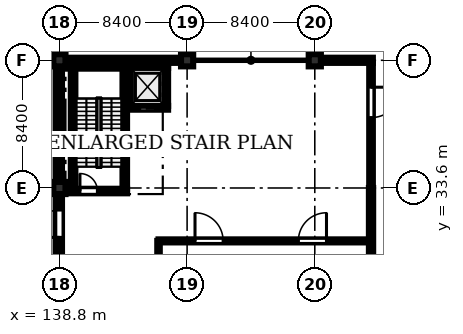
"""IFC4 building model, lengths in metres.
Left out: names, types, materials, properties, quantities, classifications, styles, units other than length and angle.
Written with IfcOpenShell. Run it as: python <this file> out.ifc"""

import sys

from ifc_helpers import new_model, si_unit, direction, frame, frame_2d, origin, origin_2d, place, context, subcontext, project, spatial, rectangle, i_section, extrude, element, fill, save


model = new_model("IFC4")
c1 = context("Model", 3, precision=1e-05, world=origin(), true_north=direction((0.0, 1.0)))
c2 = subcontext(c1, "Body", "Model", "MODEL_VIEW")
j1 = project(units=[si_unit("LENGTHUNIT", "METRE"), si_unit("PLANEANGLEUNIT", "RADIAN")], contexts=[c1])
p1 = place(None, origin())
s1 = spatial("IfcSite", under=j1, at=p1, CompositionType="ELEMENT")
p2 = place(p1, origin())
s2 = spatial("IfcBuilding", under=s1, at=p2, CompositionType="ELEMENT")
p3 = place(p2, origin())
s3 = spatial("IfcBuildingStorey", under=s2, at=p3, CompositionType="ELEMENT", Elevation=0.0)
for number, where, z_axis, x_axis in (
    (1, (138.8, 33.6, 0.0), (0.0, 0.0, 1.0), (1.0, 0.0, 0.0)),
    (2, (138.8, 42.0, 0.0), (0.0, 0.0, 1.0), (1.0, 0.0, 0.0)),
    (3, (147.2, 42.0, 0.0), (0.0, 0.0, 1.0), (1.0, 0.0, 0.0)),
    (4, (155.6, 42.0, 0.0), (0.0, 0.0, 1.0), (1.0, 0.0, 0.0)),
):
    element("IfcColumn", number, at=place(p3, frame(where, z_axis=z_axis, x_axis=x_axis)), inside=s3, PredefinedType="COLUMN", context=c2, shape_type="SweptSolid", body=[
        extrude(rectangle(XDim=0.8, YDim=0.8, at=origin_2d()), origin(), (0.0, 0.0, 1.0), 5.18),
    ])
p4 = place(p3, frame((139.2, 33.4, 0.0), z_axis=(0.0, 0.0, 1.0), x_axis=(1.0, 0.0, 0.0)))
e5 = element("IfcWall", 5, at=p4, inside=s3, PredefinedType="SHEAR", context=c2, shape_type="SweptSolid", body=[
    extrude(rectangle(XDim=4.05, YDim=0.3, at=frame_2d((2.025, 0.0))), origin(), (0.0, 0.0, 1.0), 5.18),
])
p5 = place(p4, frame((0.95, 0.0, 0.0)))
e6 = element("IfcOpeningElement", 6, at=p5, cuts=e5, PredefinedType="OPENING", context=c2, shape_type="SweptSolid", body=[
    extrude(rectangle(XDim=1.15, YDim=2.15, at=frame_2d((0.575, 1.075))), frame((0.0, 0.16, 0.0), z_axis=(0.0, -1.0, 0.0), x_axis=(1.0, 0.0, 0.0)), (0.0, 0.0, 1.0), 0.32),
])
p6 = place(p3, frame((139.2, 41.6, 0.0), z_axis=(0.0, 0.0, 1.0), x_axis=(1.0, 0.0, 0.0)))
e7 = element("IfcWall", 7, at=p6, inside=s3, PredefinedType="SHEAR", context=c2, shape_type="SweptSolid", body=[
    extrude(rectangle(XDim=4.05, YDim=0.3, at=frame_2d((2.025, 0.0))), origin(), (0.0, 0.0, 1.0), 5.18),
])
for number, where, z_axis, x_axis in (
    (8, (139.7, 33.55, 0.0), (0.0, 0.0, 1.0), (0.0, 1.0, 0.0)),
    (9, (143.1, 33.55, 0.0), (0.0, 0.0, 1.0), (0.0, 1.0, 0.0)),
):
    element("IfcWall", number, at=place(p3, frame(where, z_axis=z_axis, x_axis=x_axis)), inside=s3, PredefinedType="SHEAR", context=c2, shape_type="SweptSolid", body=[
        extrude(rectangle(XDim=7.9, YDim=0.3, at=frame_2d((3.95, 0.0))), origin(), (0.0, 0.0, 1.0), 5.18),
    ])
p7 = place(p3, frame((143.25, 38.875, 0.0), z_axis=(0.0, 0.0, 1.0), x_axis=(1.0, 0.0, 0.0)))
e10 = element("IfcWall", 10, at=p7, inside=s3, PredefinedType="SHEAR", context=c2, shape_type="SweptSolid", body=[
    extrude(rectangle(XDim=2.7, YDim=0.25, at=frame_2d((1.35, 0.0))), origin(), (0.0, 0.0, 1.0), 5.18),
])
p8 = place(p7, frame((0.835, 0.0, 0.0)))
e11 = element("IfcOpeningElement", 11, at=p8, cuts=e10, PredefinedType="OPENING", context=c2, shape_type="SweptSolid", body=[
    extrude(rectangle(XDim=1.03, YDim=2.15, at=frame_2d((0.515, 1.075))), frame((0.0, 0.135, 0.0), z_axis=(0.0, -1.0, 0.0), x_axis=(1.0, 0.0, 0.0)), (0.0, 0.0, 1.0), 0.27),
])
p9 = place(p3, frame((143.25, 41.625, 0.0), z_axis=(0.0, 0.0, 1.0), x_axis=(1.0, 0.0, 0.0)))
e12 = element("IfcWall", 12, at=p9, inside=s3, PredefinedType="SHEAR", context=c2, shape_type="SweptSolid", body=[
    extrude(rectangle(XDim=2.7, YDim=0.25, at=frame_2d((1.35, 0.0))), origin(), (0.0, 0.0, 1.0), 5.18),
])
for number, where, z_axis, x_axis in (
    (13, (143.375, 39.0, 0.0), (0.0, 0.0, 1.0), (0.0, 1.0, 0.0)),
    (14, (145.825, 39.0, 0.0), (0.0, 0.0, 1.0), (0.0, 1.0, 0.0)),
):
    element("IfcWall", number, at=place(p3, frame(where, z_axis=z_axis, x_axis=x_axis)), inside=s3, PredefinedType="SHEAR", context=c2, shape_type="SweptSolid", body=[
        extrude(rectangle(XDim=2.5, YDim=0.25, at=frame_2d((1.25, 0.0))), origin(), (0.0, 0.0, 1.0), 5.18),
    ])
p10 = place(p3, frame((139.65, 33.6, 0.0), z_axis=(0.0, 0.0, 1.0), x_axis=(1.0, 0.0, 0.0)))
e15 = element("IfcColumn", 15, at=p10, inside=s3, PredefinedType="COLUMN", context=c2, shape_type="SweptSolid", body=[
    extrude(i_section(OverallWidth=0.35, OverallDepth=0.35, WebThickness=0.012, FlangeThickness=0.019, at=origin_2d()), origin(), (0.0, 0.0, 1.0), 5.18),
])
p11 = place(p3, frame((159.3, 33.6, 0.0), z_axis=(0.0, 0.0, 1.0), x_axis=(0.0, -1.0, 0.0)))
e16 = element("IfcWall", 16, at=p11, inside=s3, PredefinedType="STANDARD", context=c2, shape_type="SweptSolid", body=[
    extrude(rectangle(XDim=8.4, YDim=0.28, at=frame_2d((4.2, 0.0))), origin(), (0.0, 0.0, 1.0), 5.18),
])
p12 = place(p3, frame((159.3, 41.83, 0.0), z_axis=(0.0, 0.0, 1.0), x_axis=(0.0, -1.0, 0.0)))
e17 = element("IfcWall", 17, at=p12, inside=s3, PredefinedType="STANDARD", context=c2, shape_type="SweptSolid", body=[
    extrude(rectangle(XDim=8.23, YDim=0.24, at=frame_2d((4.115, 0.0))), origin(), (0.0, 0.0, 1.0), 5.18),
])
p13 = place(p12, frame((1.6, 0.0, 0.0)))
e18 = element("IfcOpeningElement", 18, at=p13, cuts=e17, PredefinedType="OPENING", context=c2, shape_type="SweptSolid", body=[
    extrude(rectangle(XDim=2.0, YDim=2.4, at=frame_2d((1.0, 1.2))), frame((0.0, 0.13, 0.0), z_axis=(0.0, -1.0, 0.0), x_axis=(1.0, 0.0, 0.0)), (0.0, 0.0, 1.0), 0.26),
])
p14 = place(p12, frame((4.4, 0.0, 0.8)))
e19 = element("IfcOpeningElement", 19, at=p14, cuts=e17, PredefinedType="OPENING", context=c2, shape_type="SweptSolid", body=[
    extrude(rectangle(XDim=2.6, YDim=2.4, at=frame_2d((1.3, 1.2))), frame((0.0, 0.13, 0.0), z_axis=(0.0, -1.0, 0.0), x_axis=(1.0, 0.0, 0.0)), (0.0, 0.0, 1.0), 0.26),
])
p15 = place(p3, frame((138.8, 25.6, 0.0), z_axis=(0.0, 0.0, 1.0), x_axis=(0.0, 1.0, 0.0)))
e20 = element("IfcWall", 20, at=p15, inside=s3, PredefinedType="STANDARD", context=c2, shape_type="SweptSolid", body=[
    extrude(rectangle(XDim=7.6, YDim=0.34, at=frame_2d((3.8, 0.0))), origin(), (0.0, 0.0, 1.0), 4.43),
])
p16 = place(p15, frame((4.75, 0.0, 0.0)))
e21 = element("IfcOpeningElement", 21, at=p16, cuts=e20, PredefinedType="OPENING", context=c2, shape_type="SweptSolid", body=[
    extrude(rectangle(XDim=1.8, YDim=2.3, at=frame_2d((0.9, 1.15))), frame((0.0, 0.18, 0.0), z_axis=(0.0, -1.0, 0.0), x_axis=(1.0, 0.0, 0.0)), (0.0, 0.0, 1.0), 0.36),
])
for number, where, z_axis, x_axis in (
    (22, (138.8, 34.0, 0.0), (0.0, 0.0, 1.0), (0.0, 1.0, 0.0)),
    (23, (139.2, 42.0, 0.0), (0.0, 0.0, 1.0), (1.0, 0.0, 0.0)),
):
    element("IfcWall", number, at=place(p3, frame(where, z_axis=z_axis, x_axis=x_axis)), inside=s3, PredefinedType="STANDARD", context=c2, shape_type="SweptSolid", body=[
        extrude(rectangle(XDim=7.6, YDim=0.34, at=frame_2d((3.8, 0.0))), origin(), (0.0, 0.0, 1.0), 4.43),
    ])
p17 = place(p3, frame((156.0, 42.0, 0.0), z_axis=(0.0, 0.0, 1.0), x_axis=(1.0, 0.0, 0.0)))
e24 = element("IfcWall", 24, at=p17, inside=s3, PredefinedType="STANDARD", context=c2, shape_type="SweptSolid", body=[
    extrude(rectangle(XDim=3.42, YDim=0.34, at=frame_2d((1.71, 0.0))), origin(), (0.0, 0.0, 1.0), 4.43),
])
p18 = place(p3, frame((145.32, 30.12, 0.0), z_axis=(0.0, 0.0, 1.0), x_axis=(1.0, 0.0, 0.0)))
e25 = element("IfcWall", 25, at=p18, inside=s3, PredefinedType="SOLIDWALL", context=c2, shape_type="SweptSolid", body=[
    extrude(rectangle(XDim=13.83, YDim=0.2, at=frame_2d((6.915, 0.0))), origin(), (0.0, 0.0, 1.0), 5.18),
])
p19 = place(p18, frame((2.4, 0.0, 0.0)))
e26 = element("IfcOpeningElement", 26, at=p19, cuts=e25, PredefinedType="OPENING", context=c2, shape_type="SweptSolid", body=[
    extrude(rectangle(XDim=1.85, YDim=2.25, at=frame_2d((0.925, 1.125))), frame((0.0, 0.11, 0.0), z_axis=(0.0, -1.0, 0.0), x_axis=(1.0, 0.0, 0.0)), (0.0, 0.0, 1.0), 0.22),
])
p20 = place(p18, frame((9.2, 0.0, 0.0)))
e27 = element("IfcOpeningElement", 27, at=p20, cuts=e25, PredefinedType="OPENING", context=c2, shape_type="SweptSolid", body=[
    extrude(rectangle(XDim=1.85, YDim=2.25, at=frame_2d((0.925, 1.125))), frame((0.0, 0.11, 0.0), z_axis=(0.0, -1.0, 0.0), x_axis=(1.0, 0.0, 0.0)), (0.0, 0.0, 1.0), 0.22),
])
p21 = place(p3, frame((145.32, 9.25, 0.0), z_axis=(0.0, 0.0, 1.0), x_axis=(0.0, 1.0, 0.0)))
e28 = element("IfcWall", 28, at=p21, inside=s3, PredefinedType="PARTITIONING", context=c2, shape_type="SweptSolid", body=[
    extrude(rectangle(XDim=20.87, YDim=0.165, at=frame_2d((10.435, 0.0))), origin(), (0.0, 0.0, 1.0), 5.18),
])
p22 = place(p21, frame((3.05, 0.0, 0.0)))
e29 = element("IfcOpeningElement", 29, at=p22, cuts=e28, PredefinedType="OPENING", context=c2, shape_type="SweptSolid", body=[
    extrude(rectangle(XDim=1.0, YDim=2.12, at=frame_2d((0.5, 1.06))), frame((0.0, 0.093, 0.0), z_axis=(0.0, -1.0, 0.0), x_axis=(1.0, 0.0, 0.0)), (0.0, 0.0, 1.0), 0.185),
])
p23 = place(p21, frame((8.1, 0.0, 0.0)))
e30 = element("IfcOpeningElement", 30, at=p23, cuts=e28, PredefinedType="OPENING", context=c2, shape_type="SweptSolid", body=[
    extrude(rectangle(XDim=0.92, YDim=2.1, at=frame_2d((0.46, 1.05))), frame((0.0, 0.093, 0.0), z_axis=(0.0, -1.0, 0.0), x_axis=(1.0, 0.0, 0.0)), (0.0, 0.0, 1.0), 0.185),
])
p24 = place(p21, frame((17.5, 0.0, 0.0)))
e31 = element("IfcOpeningElement", 31, at=p24, cuts=e28, PredefinedType="OPENING", context=c2, shape_type="SweptSolid", body=[
    extrude(rectangle(XDim=1.02, YDim=2.15, at=frame_2d((0.51, 1.075))), frame((0.0, 0.093, 0.0), z_axis=(0.0, -1.0, 0.0), x_axis=(1.0, 0.0, 0.0)), (0.0, 0.0, 1.0), 0.185),
])
p25 = place(p13, origin())
e32 = element("IfcDoor", 32, at=p25, inside=s3, OperationType="SINGLE_SWING_LEFT", PredefinedType="DOOR", context=c2, shape_type="SweptSolid", body=[
    extrude(rectangle(XDim=2.0, YDim=2.4, at=frame_2d((1.0, 1.2))), frame((0.0, 0.025, 0.0), z_axis=(0.0, -1.0, 0.0), x_axis=(1.0, 0.0, 0.0)), (0.0, 0.0, 1.0), 0.05),
])
fill(e18, e32)
p26 = place(p14, origin())
e33 = element("IfcWindow", 33, at=p26, inside=s3, PartitioningType="TRIPLE_PANEL_VERTICAL", PredefinedType="WINDOW", context=c2, shape_type="SweptSolid", body=[
    extrude(rectangle(XDim=2.6, YDim=2.4, at=frame_2d((1.3, 1.2))), frame((0.0, 0.03, 0.0), z_axis=(0.0, -1.0, 0.0), x_axis=(1.0, 0.0, 0.0)), (0.0, 0.0, 1.0), 0.06),
])
fill(e19, e33)
p27 = place(p16, origin())
e34 = element("IfcDoor", 34, at=p27, inside=s3, OperationType="SINGLE_SWING_LEFT", PredefinedType="DOOR", context=c2, shape_type="SweptSolid", body=[
    extrude(rectangle(XDim=1.8, YDim=2.3, at=frame_2d((0.9, 1.15))), frame((0.0, 0.025, 0.0), z_axis=(0.0, -1.0, 0.0), x_axis=(1.0, 0.0, 0.0)), (0.0, 0.0, 1.0), 0.05),
])
fill(e21, e34)
p28 = place(p19, origin())
e35 = element("IfcDoor", 35, at=p28, inside=s3, OperationType="SINGLE_SWING_LEFT", PredefinedType="DOOR", context=c2, shape_type="SweptSolid", body=[
    extrude(rectangle(XDim=1.85, YDim=2.25, at=frame_2d((0.925, 1.125))), frame((0.0, 0.025, 0.0), z_axis=(0.0, -1.0, 0.0), x_axis=(1.0, 0.0, 0.0)), (0.0, 0.0, 1.0), 0.05),
])
fill(e26, e35)
p29 = place(p20, origin())
e36 = element("IfcDoor", 36, at=p29, inside=s3, OperationType="SINGLE_SWING_RIGHT", PredefinedType="DOOR", context=c2, shape_type="SweptSolid", body=[
    extrude(rectangle(XDim=1.85, YDim=2.25, at=frame_2d((0.925, 1.125))), frame((0.0, 0.025, 0.0), z_axis=(0.0, -1.0, 0.0), x_axis=(1.0, 0.0, 0.0)), (0.0, 0.0, 1.0), 0.05),
])
fill(e27, e36)
p30 = place(p5, origin())
e37 = element("IfcDoor", 37, at=p30, inside=s3, OperationType="SINGLE_SWING_LEFT", PredefinedType="DOOR", context=c2, shape_type="SweptSolid", body=[
    extrude(rectangle(XDim=1.15, YDim=2.15, at=frame_2d((0.575, 1.075))), frame((0.0, 0.025, 0.0), z_axis=(0.0, -1.0, 0.0), x_axis=(1.0, 0.0, 0.0)), (0.0, 0.0, 1.0), 0.05),
])
fill(e6, e37)
p31 = place(p8, origin())
e38 = element("IfcDoor", 38, at=p31, inside=s3, OperationType="SLIDING_TO_LEFT", PredefinedType="DOOR", context=c2, shape_type="SweptSolid", body=[
    extrude(rectangle(XDim=1.03, YDim=2.15, at=frame_2d((0.515, 1.075))), frame((0.0, 0.025, 0.0), z_axis=(0.0, -1.0, 0.0), x_axis=(1.0, 0.0, 0.0)), (0.0, 0.0, 1.0), 0.05),
])
fill(e11, e38)
save(model, sys.argv[1])
